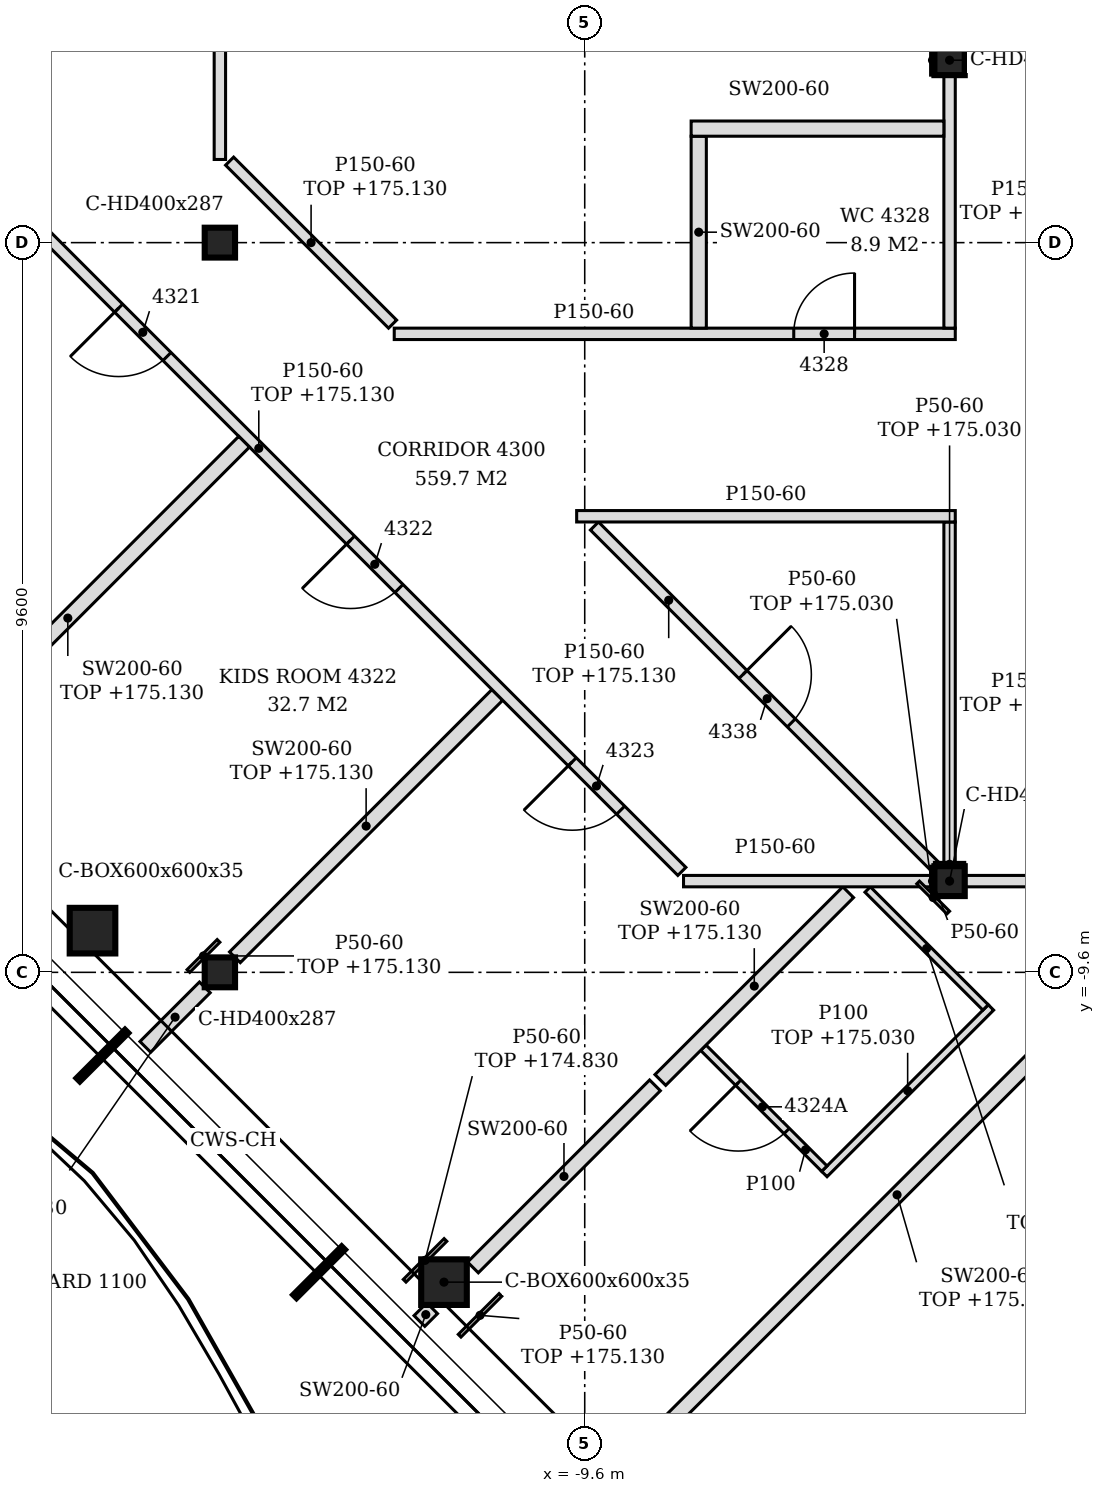
"""IFC4 building model, lengths in metres.
Left out: names, types, materials, properties, quantities, classifications, styles, units other than length and angle.
Written with IfcOpenShell. Run it as: python <this file> out.ifc"""

import sys

from ifc_helpers import new_model, si_unit, direction, frame, frame_2d, origin, origin_2d, place, context, subcontext, project, spatial, polyline, rectangle, hollow_rectangle, i_section, outline, extrude, clip, halfspace, element, fill, save


model = new_model("IFC4")
c1 = context("Model", 3, precision=1e-05, world=origin(), true_north=direction((0.0, 1.0)))
c2 = subcontext(c1, "Body", "Model", "MODEL_VIEW")
j1 = project(units=[si_unit("LENGTHUNIT", "METRE"), si_unit("PLANEANGLEUNIT", "RADIAN")], contexts=[c1])
p1 = place(None, origin())
s1 = spatial("IfcSite", under=j1, at=p1, CompositionType="ELEMENT")
p2 = place(p1, origin())
s2 = spatial("IfcBuilding", under=s1, at=p2, CompositionType="ELEMENT")
p3 = place(p2, frame((0.0, 0.0, 172.2)))
s3 = spatial("IfcBuildingStorey", under=s2, at=p3, CompositionType="ELEMENT", Elevation=172.2)
p4 = place(p3, frame((-16.076, -9.052, -0.15), z_axis=(0.06235395728, -0.04152421884, 0.997189913337), x_axis=(0.554283476609, 0.832327956732, 0.0)))
e1 = element("IfcColumn", 1, at=p4, inside=s3, PredefinedType="COLUMN", context=c2, shape_type="Clipping", body=[
    clip(clip(extrude(hollow_rectangle(XDim=0.6, YDim=0.6, WallThickness=0.035, at=origin_2d()), origin(), (0.0, 0.0, 1.0), 3.61), halfspace(frame((0.0, 0.0, 0.011), z_axis=(0.0, 0.0, 1.0), x_axis=(1.0, 0.0, 0.0)), True)), halfspace(frame((0.0, 0.0, 3.588), z_axis=(0.0, 0.0, 1.0), x_axis=(1.0, 0.0, 0.0)), False)),
])
p5 = place(p3, frame((-11.451, -13.676, -0.15), z_axis=(0.062286590776, -0.041524393851, 0.99719411617), x_axis=(0.554700196225, 0.832050294338, 0.0)))
e2 = element("IfcColumn", 2, at=p5, inside=s3, PredefinedType="COLUMN", context=c2, shape_type="Clipping", body=[
    clip(clip(extrude(hollow_rectangle(XDim=0.6, YDim=0.6, WallThickness=0.035, at=origin_2d()), origin(), (0.0, 0.0, 1.0), 3.61), halfspace(frame((0.0, 0.0, 0.011), z_axis=(0.0, 0.0, 1.0), x_axis=(1.0, 0.0, 0.0)), True)), halfspace(frame((0.0, 0.0, 3.588), z_axis=(0.0, 0.0, 1.0), x_axis=(1.0, 0.0, 0.0)), False)),
])
for number, where, z_axis, x_axis in (
    (3, (-4.8, -8.4, -0.15), (0.0, 0.0, 1.0), (1.0, 0.0, 0.0)),
    (4, (-4.8, 2.4, -0.15), (0.0, 0.0, 1.0), (1.0, 0.0, 0.0)),
    (5, (-14.4, -9.6, -0.15), (0.0, 0.0, 1.0), (1.0, 0.0, 0.0)),
    (6, (-14.4, 0.0, -0.15), (0.0, 0.0, 1.0), (1.0, 0.0, 0.0)),
):
    element("IfcColumn", number, at=place(p3, frame(where, z_axis=z_axis, x_axis=x_axis)), inside=s3, PredefinedType="COLUMN", context=c2, shape_type="SweptSolid", body=[
        extrude(i_section(OverallWidth=0.399, OverallDepth=0.393, WebThickness=0.023, FlangeThickness=0.037, FilletRadius=0.015, at=origin_2d()), origin(), (0.0, 0.0, 1.0), 3.6),
    ])
p6 = place(p3, frame((-9.472, -16.508, 0.0), z_axis=(0.0, 0.0, 1.0), x_axis=(0.707095940397, 0.70711762181, 0.0)))
e7 = element("IfcWall", 7, at=p6, inside=s3, PredefinedType="PARTITIONING", context=c2, shape_type="SweptSolid", body=[
    extrude(rectangle(XDim=11.26, YDim=0.2, at=frame_2d((5.63, 0.0))), origin(), (0.0, 0.0, 1.0), 2.83),
])
p7 = place(p3, frame((-11.775, -14.187, 0.0), z_axis=(0.0, 0.0, 1.0), x_axis=(0.707106781187, 0.707106781187, 0.0)))
e8 = element("IfcWall", 8, at=p7, inside=s3, PredefinedType="PARTITIONING", context=c2, shape_type="SweptSolid", body=[
    extrude(rectangle(XDim=0.237, YDim=0.2, at=frame_2d((0.118, 0.0))), origin(), (0.0, 0.0, 1.0), 3.45),
])
p8 = place(p3, frame((-11.071, -13.482, 0.0), z_axis=(0.0, 0.0, 1.0), x_axis=(0.707034704659, 0.707178850368, 0.0)))
e9 = element("IfcWall", 9, at=p8, inside=s3, PredefinedType="PARTITIONING", context=c2, shape_type="SweptSolid", body=[
    extrude(rectangle(XDim=3.387, YDim=0.2, at=frame_2d((1.694, 0.0))), origin(), (0.0, 0.0, 1.0), 3.45),
])
p9 = place(p3, frame((-6.448, -12.253, 0.0), z_axis=(0.0, 0.0, 1.0), x_axis=(0.707146162255, 0.707067397924, 0.0)))
e10 = element("IfcWall", 10, at=p9, inside=s3, PredefinedType="PARTITIONING", context=c2, shape_type="SweptSolid", body=[
    extrude(rectangle(XDim=3.1, YDim=0.1, at=frame_2d((1.55, 0.0))), origin(), (0.0, 0.0, 1.0), 2.83),
])
p10 = place(p3, frame((-6.448, -12.183, 0.0), z_axis=(0.0, 0.0, 1.0), x_axis=(-0.707323718364, 0.706889777433, 0.0)))
e11 = element("IfcWall", 11, at=p10, inside=s3, PredefinedType="PARTITIONING", context=c2, shape_type="SweptSolid", body=[
    extrude(rectangle(XDim=2.25, YDim=0.1, at=frame_2d((1.125, 0.0))), origin(), (0.0, 0.0, 1.0), 3.45),
])
p11 = place(p10, frame((0.701, 0.0, 0.0)))
e12 = element("IfcOpeningElement", 12, at=p11, cuts=e11, PredefinedType="OPENING", context=c2, shape_type="SweptSolid", body=[
    extrude(rectangle(XDim=0.9, YDim=2.1, at=frame_2d((0.45, 1.05))), frame((0.0, 0.06, 0.0), z_axis=(0.0, -1.0, 0.0), x_axis=(1.0, 0.0, 0.0)), (0.0, 0.0, 1.0), 0.12),
])
p12 = place(p3, frame((-8.605, -11.016, 0.0), z_axis=(0.0, 0.0, 1.0), x_axis=(0.707246511798, 0.706967022957, 0.0)))
e13 = element("IfcWall", 13, at=p12, inside=s3, PredefinedType="PARTITIONING", context=c2, shape_type="SweptSolid", body=[
    extrude(rectangle(XDim=3.494, YDim=0.2, at=frame_2d((1.747, 0.0))), origin(), (0.0, 0.0, 1.0), 2.93),
])
p13 = place(p3, frame((-15.381, -10.581, 0.0), z_axis=(0.0, 0.0, 1.0), x_axis=(0.707217034054, 0.706996511125, 0.0)))
e14 = element("IfcWall", 14, at=p13, inside=s3, PredefinedType="PARTITIONING", context=c2, shape_type="SweptSolid", body=[
    extrude(rectangle(XDim=1.107, YDim=0.2, at=frame_2d((0.554, 0.0))), origin(), (0.0, 0.0, 1.0), 2.63),
])
p14 = place(p3, frame((-4.326, -10.062, 0.0), z_axis=(0.0, 0.0, 1.0), x_axis=(-0.707106781187, 0.707106781187, 0.0)))
e15 = element("IfcWall", 15, at=p14, inside=s3, PredefinedType="PARTITIONING", context=c2, shape_type="SweptSolid", body=[
    extrude(rectangle(XDim=2.194, YDim=0.1, at=frame_2d((1.097, 0.0))), origin(), (0.0, 0.0, 1.0), 2.83),
])
p15 = place(p3, frame((-14.202, -9.402, 0.0), z_axis=(0.0, 0.0, 1.0), x_axis=(0.707081776084, 0.707131785404, 0.0)))
e16 = element("IfcWall", 16, at=p15, inside=s3, PredefinedType="PARTITIONING", context=c2, shape_type="SweptSolid", body=[
    extrude(rectangle(XDim=4.882, YDim=0.2, at=frame_2d((2.441, 0.0))), origin(), (0.0, 0.0, 1.0), 2.93),
])
p16 = place(p3, frame((-8.3, -8.4, 0.0), z_axis=(0.0, 0.0, 1.0), x_axis=(1.0, 0.0, 0.0)))
e17 = element("IfcWall", 17, at=p16, inside=s3, PredefinedType="PARTITIONING", context=c2, shape_type="SweptSolid", body=[
    extrude(rectangle(XDim=3.301, YDim=0.15, at=frame_2d((1.65, 0.0))), origin(), (0.0, 0.0, 1.0), 3.45),
])
p17 = place(p3, frame((-4.601, -8.4, 0.0), z_axis=(0.0, 0.0, 1.0), x_axis=(1.0, 0.0, 0.0)))
e18 = element("IfcWall", 18, at=p17, inside=s3, PredefinedType="PARTITIONING", context=c2, shape_type="SweptSolid", body=[
    extrude(rectangle(XDim=11.601, YDim=0.15, at=frame_2d((5.801, 0.0))), origin(), (0.0, 0.0, 1.0), 2.83),
])
p18 = place(p17, frame((1.068, 0.0, 0.0)))
e19 = element("IfcOpeningElement", 19, at=p18, cuts=e18, PredefinedType="OPENING", context=c2, shape_type="SweptSolid", body=[
    extrude(rectangle(XDim=0.9, YDim=2.1, at=frame_2d((0.45, 1.05))), frame((0.0, 0.085, 0.0), z_axis=(0.0, -1.0, 0.0), x_axis=(1.0, 0.0, 0.0)), (0.0, 0.0, 1.0), 0.17),
])
p19 = place(p17, frame((4.787, 0.0, 0.0)))
e20 = element("IfcOpeningElement", 20, at=p19, cuts=e18, PredefinedType="OPENING", context=c2, shape_type="SweptSolid", body=[
    extrude(rectangle(XDim=0.9, YDim=2.1, at=frame_2d((0.45, 1.05))), frame((0.0, 0.085, 0.0), z_axis=(0.0, -1.0, 0.0), x_axis=(1.0, 0.0, 0.0)), (0.0, 0.0, 1.0), 0.17),
])
p20 = place(p17, frame((8.704, 0.0, 0.0)))
e21 = element("IfcOpeningElement", 21, at=p20, cuts=e18, PredefinedType="OPENING", context=c2, shape_type="SweptSolid", body=[
    extrude(rectangle(XDim=0.9, YDim=2.1, at=frame_2d((0.45, 1.05))), frame((0.0, 0.085, 0.0), z_axis=(0.0, -1.0, 0.0), x_axis=(1.0, 0.0, 0.0)), (0.0, 0.0, 1.0), 0.17),
])
p21 = place(p3, frame((-8.322, -8.272, 0.0), z_axis=(0.0, 0.0, 1.0), x_axis=(-0.707117118476, 0.707096443746, 0.0)))
e22 = element("IfcWall", 22, at=p21, inside=s3, PredefinedType="PARTITIONING", context=c2, shape_type="SweptSolid", body=[
    extrude(rectangle(XDim=11.809, YDim=0.15, at=frame_2d((5.904, 0.0))), origin(), (0.0, 0.0, 1.0), 2.93),
])
p22 = place(p21, frame((9.579, 0.0, 0.0)))
e23 = element("IfcOpeningElement", 23, at=p22, cuts=e22, PredefinedType="OPENING", context=c2, shape_type="SweptSolid", body=[
    extrude(rectangle(XDim=0.9, YDim=2.1, at=frame_2d((0.45, 1.05))), frame((0.0, 0.085, 0.0), z_axis=(0.0, -1.0, 0.0), x_axis=(1.0, 0.0, 0.0)), (0.0, 0.0, 1.0), 0.17),
])
p23 = place(p21, frame((5.264, 0.0, 0.0)))
e24 = element("IfcOpeningElement", 24, at=p23, cuts=e22, PredefinedType="OPENING", context=c2, shape_type="SweptSolid", body=[
    extrude(rectangle(XDim=0.9, YDim=2.1, at=frame_2d((0.45, 1.05))), frame((0.0, 0.085, 0.0), z_axis=(0.0, -1.0, 0.0), x_axis=(1.0, 0.0, 0.0)), (0.0, 0.0, 1.0), 0.17),
])
p24 = place(p21, frame((1.139, 0.0, 0.0)))
e25 = element("IfcOpeningElement", 25, at=p24, cuts=e22, PredefinedType="OPENING", context=c2, shape_type="SweptSolid", body=[
    extrude(rectangle(XDim=0.9, YDim=2.1, at=frame_2d((0.45, 1.05))), frame((0.0, 0.085, 0.0), z_axis=(0.0, -1.0, 0.0), x_axis=(1.0, 0.0, 0.0)), (0.0, 0.0, 1.0), 0.17),
])
p25 = place(p3, frame((-4.998, -8.202, 0.0), z_axis=(0.0, 0.0, 1.0), x_axis=(-0.707106781187, 0.707106781187, 0.0)))
e26 = element("IfcWall", 26, at=p25, inside=s3, PredefinedType="PARTITIONING", context=c2, shape_type="SweptSolid", body=[
    extrude(rectangle(XDim=6.327, YDim=0.15, at=frame_2d((3.164, 0.0))), origin(), (0.0, 0.0, 1.0), 2.93),
])
p26 = place(p25, frame((2.664, 0.0, 0.0)))
e27 = element("IfcOpeningElement", 27, at=p26, cuts=e26, PredefinedType="OPENING", context=c2, shape_type="SweptSolid", body=[
    extrude(rectangle(XDim=0.9, YDim=2.1, at=frame_2d((0.45, 1.05))), frame((0.0, 0.085, 0.0), z_axis=(0.0, -1.0, 0.0), x_axis=(1.0, 0.0, 0.0)), (0.0, 0.0, 1.0), 0.17),
])
p27 = place(p3, frame((-4.8, -8.204, 0.0), z_axis=(0.0, 0.0, 1.0), x_axis=(0.0, 1.0, 0.0)))
e28 = element("IfcWall", 28, at=p27, inside=s3, PredefinedType="PARTITIONING", context=c2, shape_type="SweptSolid", body=[
    extrude(rectangle(XDim=4.529, YDim=0.15, at=frame_2d((2.264, 0.0))), origin(), (0.0, 0.0, 1.0), 2.83),
])
p28 = place(p3, frame((-18.72, -7.26, 0.0), z_axis=(0.0, 0.0, 1.0), x_axis=(0.706939337177, 0.707274185555, 0.0)))
e29 = element("IfcWall", 29, at=p28, inside=s3, PredefinedType="PARTITIONING", context=c2, shape_type="SweptSolid", body=[
    extrude(rectangle(XDim=6.562, YDim=0.2, at=frame_2d((3.281, 0.0))), origin(), (0.0, 0.0, 1.0), 2.93),
])
p29 = place(p3, frame((-9.706, -3.6, 0.0), z_axis=(0.0, 0.0, 1.0), x_axis=(1.0, 0.0, 0.0)))
e30 = element("IfcWall", 30, at=p29, inside=s3, PredefinedType="PARTITIONING", context=c2, shape_type="SweptSolid", body=[
    extrude(outline(polyline([(0.0, 0.0), (4.981, 0.0), (4.981, 2.83), (4.756, 2.83), (4.754, 3.45), (0.0, 3.45), (0.0, 0.0)])), frame((0.0, 0.075, 0.0), z_axis=(0.0, -1.0, 0.0), x_axis=(1.0, 0.0, 0.0)), (0.0, 0.0, 1.0), 0.15),
])
p30 = place(p3, frame((-12.106, -1.2, 0.0), z_axis=(0.0, 0.0, 1.0), x_axis=(1.0, 0.0, 0.0)))
e31 = element("IfcWall", 31, at=p30, inside=s3, PredefinedType="PARTITIONING", context=c2, shape_type="SweptSolid", body=[
    extrude(outline(polyline([(0.0, 0.0), (7.381, 0.0), (7.381, 2.83), (7.156, 2.83), (7.154, 3.45), (0.0, 3.45), (0.0, 0.0)])), frame((0.0, 0.075, 0.0), z_axis=(0.0, -1.0, 0.0), x_axis=(1.0, 0.0, 0.0)), (0.0, 0.0, 1.0), 0.15),
])
p31 = place(p30, frame((5.256, 0.0, 0.0)))
e32 = element("IfcOpeningElement", 32, at=p31, cuts=e31, PredefinedType="OPENING", context=c2, shape_type="SweptSolid", body=[
    extrude(rectangle(XDim=0.8, YDim=2.1, at=frame_2d((0.4, 1.05))), frame((0.0, 0.085, 0.0), z_axis=(0.0, -1.0, 0.0), x_axis=(1.0, 0.0, 0.0)), (0.0, 0.0, 1.0), 0.17),
])
p32 = place(p3, frame((-12.128, -1.072, 0.0), z_axis=(0.0, 0.0, 1.0), x_axis=(-0.707106781187, 0.707106781187, 0.0)))
e33 = element("IfcWall", 33, at=p32, inside=s3, PredefinedType="PARTITIONING", context=c2, shape_type="SweptSolid", body=[
    extrude(rectangle(XDim=3.032, YDim=0.15, at=frame_2d((1.516, 0.0))), origin(), (0.0, 0.0, 1.0), 2.93),
])
p33 = place(p3, frame((-8.1, -1.125, 0.0), z_axis=(0.0, 0.0, 1.0), x_axis=(0.0, 1.0, 0.0)))
e34 = element("IfcWall", 34, at=p33, inside=s3, PredefinedType="PARTITIONING", context=c2, shape_type="SweptSolid", body=[
    extrude(outline(polyline([(0.0, 0.0), (2.525, 0.0), (2.525, 3.45), (1.075, 3.45), (1.073, 2.93), (0.875, 2.93), (0.873, 3.45), (0.0, 3.45), (0.0, 0.0)])), frame((0.0, 0.1, 0.0), z_axis=(0.0, -1.0, 0.0), x_axis=(1.0, 0.0, 0.0)), (0.0, 0.0, 1.0), 0.2),
])
p34 = place(p3, frame((-4.8, -1.125, 0.0), z_axis=(0.0, 0.0, 1.0), x_axis=(0.0, 1.0, 0.0)))
e35 = element("IfcWall", 35, at=p34, inside=s3, PredefinedType="PARTITIONING", context=c2, shape_type="SweptSolid", body=[
    extrude(rectangle(XDim=3.329, YDim=0.15, at=frame_2d((1.664, 0.0))), origin(), (0.0, 0.0, 1.0), 2.83),
])
p35 = place(p3, frame((-14.4, 1.094, 0.0), z_axis=(0.0, 0.0, 1.0), x_axis=(0.0, 1.0, 0.0)))
e36 = element("IfcWall", 36, at=p35, inside=s3, PredefinedType="PARTITIONING", context=c2, shape_type="SweptSolid", body=[
    extrude(rectangle(XDim=8.31, YDim=0.15, at=frame_2d((4.155, 0.0))), origin(), (0.0, 0.0, 1.0), 2.93),
])
p36 = place(p3, frame((-8.2, 1.5, 0.0), z_axis=(0.0, 0.0, 1.0), x_axis=(1.0, 0.0, 0.0)))
e37 = element("IfcWall", 37, at=p36, inside=s3, PredefinedType="PARTITIONING", context=c2, shape_type="SweptSolid", body=[
    extrude(outline(polyline([(0.0, 0.0), (3.325, 0.0), (3.325, 2.83), (3.25, 2.83), (3.248, 3.45), (0.0, 3.45), (0.0, 0.0)])), frame((0.0, 0.1, 0.0), z_axis=(0.0, -1.0, 0.0), x_axis=(1.0, 0.0, 0.0)), (0.0, 0.0, 1.0), 0.2),
])
p37 = place(p3, frame((-11.969, -13.658, 0.0), z_axis=(0.0, 0.0, 1.0), x_axis=(0.706946020301, 0.707267505531, 0.0)))
e38 = element("IfcWall", 38, at=p37, inside=s3, PredefinedType="PARTITIONING", context=c2, shape_type="SweptSolid", body=[
    extrude(rectangle(XDim=0.76, YDim=0.05, at=frame_2d((0.38, 0.0))), origin(), (0.0, 0.0, 1.0), 2.63),
])
p38 = place(p3, frame((-11.246, -14.381, 0.0), z_axis=(0.0, 0.0, 1.0), x_axis=(0.707106781187, 0.707106781187, 0.0)))
e39 = element("IfcWall", 39, at=p38, inside=s3, PredefinedType="PARTITIONING", context=c2, shape_type="SweptSolid", body=[
    extrude(rectangle(XDim=0.759, YDim=0.05, at=frame_2d((0.38, 0.0))), origin(), (0.0, 0.0, 1.0), 2.93),
])
p39 = place(p3, frame((-14.814, -9.582, 0.0), z_axis=(0.0, 0.0, 1.0), x_axis=(0.707106781187, 0.707106781187, 0.0)))
e40 = element("IfcWall", 40, at=p39, inside=s3, PredefinedType="PARTITIONING", context=c2, shape_type="SweptSolid", body=[
    extrude(rectangle(XDim=0.56, YDim=0.05, at=frame_2d((0.28, 0.0))), origin(), (0.0, 0.0, 1.0), 2.93),
])
p40 = place(p3, frame((-5.0, -8.178, 0.0), z_axis=(0.0, 0.0, 1.0), x_axis=(1.0, 0.0, 0.0)))
e41 = element("IfcWall", 41, at=p40, inside=s3, PredefinedType="PARTITIONING", context=c2, shape_type="SweptSolid", body=[
    extrude(rectangle(XDim=0.399, YDim=0.05, at=frame_2d((0.199, 0.0))), origin(), (0.0, 0.0, 1.0), 2.83),
])
p41 = place(p3, frame((-4.818, -8.814, 0.0), z_axis=(0.0, 0.0, 1.0), x_axis=(-0.707106781187, 0.707106781187, 0.0)))
e42 = element("IfcWall", 42, at=p41, inside=s3, PredefinedType="PARTITIONING", context=c2, shape_type="SweptSolid", body=[
    extrude(rectangle(XDim=0.56, YDim=0.05, at=frame_2d((0.28, 0.0))), origin(), (0.0, 0.0, 1.0), 2.83),
])
for number, where, z_axis, x_axis in (
    (43, (-5.024, -8.596, 0.0), (0.0, 0.0, 1.0), (0.0, 1.0, 0.0)),
    (44, (-5.024, 2.204, 0.0), (0.0, 0.0, 1.0), (0.0, 1.0, 0.0)),
):
    element("IfcWall", number, at=place(p3, frame(where, z_axis=z_axis, x_axis=x_axis)), inside=s3, PredefinedType="PARTITIONING", context=c2, shape_type="SweptSolid", body=[
        extrude(rectangle(XDim=0.393, YDim=0.05, at=frame_2d((0.196, 0.0))), origin(), (0.0, 0.0, 1.0), 3.45),
    ])
p42 = place(p22, origin())
e45 = element("IfcDoor", 45, at=p42, inside=s3, OperationType="SINGLE_SWING_RIGHT", PredefinedType="DOOR", context=c2, shape_type="SweptSolid", body=[
    extrude(rectangle(XDim=0.9, YDim=2.1, at=frame_2d((0.45, 1.05))), frame((0.0, 0.025, 0.0), z_axis=(0.0, -1.0, 0.0), x_axis=(1.0, 0.0, 0.0)), (0.0, 0.0, 1.0), 0.05),
])
fill(e23, e45)
p43 = place(p23, origin())
e46 = element("IfcDoor", 46, at=p43, inside=s3, OperationType="SINGLE_SWING_RIGHT", PredefinedType="DOOR", context=c2, shape_type="SweptSolid", body=[
    extrude(rectangle(XDim=0.9, YDim=2.1, at=frame_2d((0.45, 1.05))), frame((0.0, 0.025, 0.0), z_axis=(0.0, -1.0, 0.0), x_axis=(1.0, 0.0, 0.0)), (0.0, 0.0, 1.0), 0.05),
])
fill(e24, e46)
p44 = place(p24, origin())
e47 = element("IfcDoor", 47, at=p44, inside=s3, OperationType="SINGLE_SWING_RIGHT", PredefinedType="DOOR", context=c2, shape_type="SweptSolid", body=[
    extrude(rectangle(XDim=0.9, YDim=2.1, at=frame_2d((0.45, 1.05))), frame((0.0, 0.025, 0.0), z_axis=(0.0, -1.0, 0.0), x_axis=(1.0, 0.0, 0.0)), (0.0, 0.0, 1.0), 0.05),
])
fill(e25, e47)
p45 = place(p11, origin())
e48 = element("IfcDoor", 48, at=p45, inside=s3, OperationType="SINGLE_SWING_RIGHT", PredefinedType="DOOR", context=c2, shape_type="SweptSolid", body=[
    extrude(rectangle(XDim=0.9, YDim=2.1, at=frame_2d((0.45, 1.05))), frame((0.0, 0.025, 0.0), z_axis=(0.0, -1.0, 0.0), x_axis=(1.0, 0.0, 0.0)), (0.0, 0.0, 1.0), 0.05),
])
fill(e12, e48)
p46 = place(p31, origin())
e49 = element("IfcDoor", 49, at=p46, inside=s3, OperationType="SINGLE_SWING_RIGHT", PredefinedType="DOOR", context=c2, shape_type="SweptSolid", body=[
    extrude(rectangle(XDim=0.8, YDim=2.1, at=frame_2d((0.4, 1.05))), frame((0.0, 0.025, 0.0), z_axis=(0.0, -1.0, 0.0), x_axis=(1.0, 0.0, 0.0)), (0.0, 0.0, 1.0), 0.05),
])
fill(e32, e49)
p47 = place(p26, frame((0.9, 0.0, 0.0), z_axis=(0.0, 0.0, 1.0), x_axis=(-1.0, 0.0, 0.0)))
e50 = element("IfcDoor", 50, at=p47, inside=s3, OperationType="SINGLE_SWING_LEFT", PredefinedType="DOOR", context=c2, shape_type="SweptSolid", body=[
    extrude(rectangle(XDim=0.9, YDim=2.1, at=frame_2d((0.45, 1.05))), frame((0.0, 0.025, 0.0), z_axis=(0.0, -1.0, 0.0), x_axis=(1.0, 0.0, 0.0)), (0.0, 0.0, 1.0), 0.05),
])
fill(e27, e50)
save(model, sys.argv[1])
